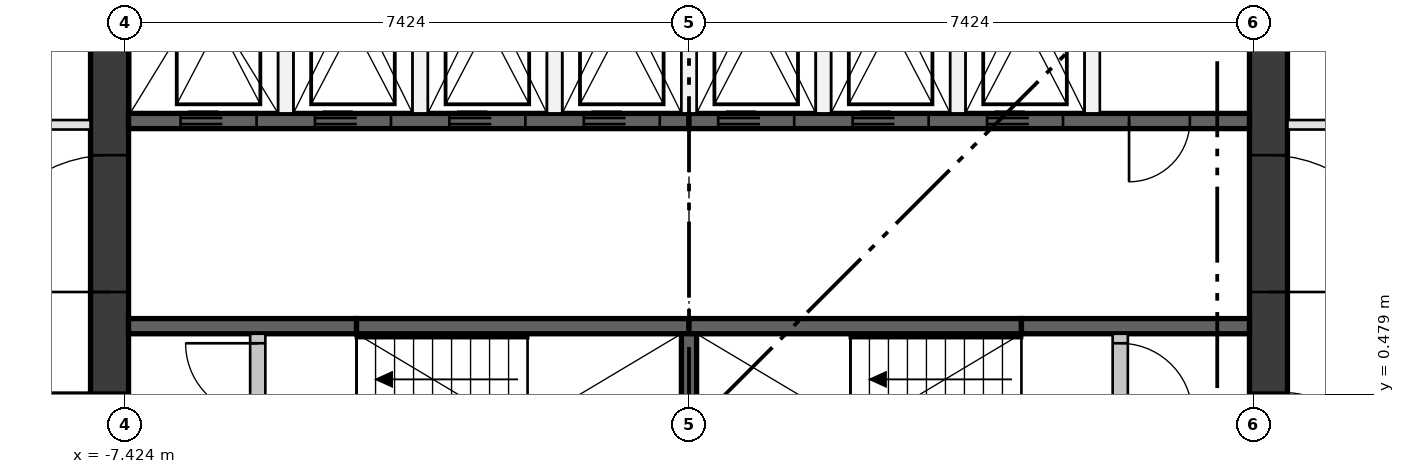
"""IFC4 building model, lengths in metres.
Left out: names, types, materials, properties, quantities, classifications, styles, units other than length and angle.
Written with IfcOpenShell. Run it as: python <this file> out.ifc"""

import sys

from ifc_helpers import new_model, si_unit, direction, frame, frame_2d, origin, place, context, subcontext, project, spatial, rectangle, extrude, element, fill, save


model = new_model("IFC4")
c1 = context("Model", 3, precision=1e-05, world=origin(), true_north=direction((0.0, 1.0)))
c2 = subcontext(c1, "Body", "Model", "MODEL_VIEW")
j1 = project(units=[si_unit("LENGTHUNIT", "METRE"), si_unit("PLANEANGLEUNIT", "RADIAN")], contexts=[c1])
p1 = place(None, origin())
s1 = spatial("IfcSite", under=j1, at=p1, CompositionType="ELEMENT")
p2 = place(p1, origin())
s2 = spatial("IfcBuilding", under=s1, at=p2, CompositionType="ELEMENT")
p3 = place(p2, frame((0.0, 0.0, 174.25)))
s3 = spatial("IfcBuildingStorey", under=s2, at=p3, CompositionType="ELEMENT", Elevation=174.25)
p4 = place(p3, frame((-7.624, -7.374, 0.0), z_axis=(0.0, 0.0, 1.0), x_axis=(0.0, 1.0, 0.0)))
e1 = element("IfcWall", 1, at=p4, inside=s3, PredefinedType="SHEAR", context=c2, shape_type="SweptSolid", body=[
    extrude(rectangle(XDim=14.748, YDim=0.5, at=frame_2d((7.374, 0.0))), origin(), (0.0, 0.0, 1.0), 3.35),
])
p5 = place(p4, frame((6.874, 0.0, 0.0)))
e2 = element("IfcOpeningElement", 2, at=p5, cuts=e1, PredefinedType="OPENING", context=c2, shape_type="SweptSolid", body=[
    extrude(rectangle(XDim=1.0, YDim=2.1, at=frame_2d((0.5, 1.05))), frame((0.0, 0.26, 0.0), z_axis=(0.0, -1.0, 0.0), x_axis=(1.0, 0.0, 0.0)), (0.0, 0.0, 1.0), 0.52),
])
p6 = place(p4, frame((3.75, 0.0, 0.0)))
e3 = element("IfcOpeningElement", 3, at=p6, cuts=e1, PredefinedType="OPENING", context=c2, shape_type="SweptSolid", body=[
    extrude(rectangle(XDim=1.8, YDim=2.1, at=frame_2d((0.9, 1.05))), frame((0.0, 0.26, 0.0), z_axis=(0.0, -1.0, 0.0), x_axis=(1.0, 0.0, 0.0)), (0.0, 0.0, 1.0), 0.52),
])
p7 = place(p4, frame((9.198, 0.0, 0.0)))
e4 = element("IfcOpeningElement", 4, at=p7, cuts=e1, PredefinedType="OPENING", context=c2, shape_type="SweptSolid", body=[
    extrude(rectangle(XDim=1.8, YDim=2.1, at=frame_2d((0.9, 1.05))), frame((0.0, 0.26, 0.0), z_axis=(0.0, -1.0, 0.0), x_axis=(1.0, 0.0, 0.0)), (0.0, 0.0, 1.0), 0.52),
])
p8 = place(p3, frame((7.624, -7.374, 0.0), z_axis=(0.0, 0.0, 1.0), x_axis=(0.0, 1.0, 0.0)))
e5 = element("IfcWall", 5, at=p8, inside=s3, PredefinedType="SHEAR", context=c2, shape_type="SweptSolid", body=[
    extrude(rectangle(XDim=14.748, YDim=0.5, at=frame_2d((7.374, 0.0))), origin(), (0.0, 0.0, 1.0), 3.35),
])
p9 = place(p8, frame((6.874, 0.0, 0.0)))
e6 = element("IfcOpeningElement", 6, at=p9, cuts=e5, PredefinedType="OPENING", context=c2, shape_type="SweptSolid", body=[
    extrude(rectangle(XDim=1.0, YDim=2.1, at=frame_2d((0.5, 1.05))), frame((0.0, 0.26, 0.0), z_axis=(0.0, -1.0, 0.0), x_axis=(1.0, 0.0, 0.0)), (0.0, 0.0, 1.0), 0.52),
])
p10 = place(p8, frame((3.75, 0.0, 0.0)))
e7 = element("IfcOpeningElement", 7, at=p10, cuts=e5, PredefinedType="OPENING", context=c2, shape_type="SweptSolid", body=[
    extrude(rectangle(XDim=1.8, YDim=2.1, at=frame_2d((0.9, 1.05))), frame((0.0, 0.26, 0.0), z_axis=(0.0, -1.0, 0.0), x_axis=(1.0, 0.0, 0.0)), (0.0, 0.0, 1.0), 0.52),
])
p11 = place(p8, frame((9.198, 0.0, 0.0)))
e8 = element("IfcOpeningElement", 8, at=p11, cuts=e5, PredefinedType="OPENING", context=c2, shape_type="SweptSolid", body=[
    extrude(rectangle(XDim=1.8, YDim=2.1, at=frame_2d((0.9, 1.05))), frame((0.0, 0.26, 0.0), z_axis=(0.0, -1.0, 0.0), x_axis=(1.0, 0.0, 0.0)), (0.0, 0.0, 1.0), 0.52),
])
p12 = place(p3, frame((-7.374, 4.074, 0.0), z_axis=(0.0, 0.0, 1.0), x_axis=(1.0, 0.0, 0.0)))
e9 = element("IfcWall", 9, at=p12, inside=s3, PredefinedType="SHEAR", context=c2, shape_type="SweptSolid", body=[
    extrude(rectangle(XDim=7.374, YDim=0.2, at=frame_2d((3.687, 0.0))), origin(), (0.0, 0.0, 1.0), 3.0),
])
p13 = place(p12, frame((0.684, 0.0, 0.0)))
e10 = element("IfcOpeningElement", 10, at=p13, cuts=e9, PredefinedType="OPENING", context=c2, shape_type="SweptSolid", body=[
    extrude(rectangle(XDim=1.0, YDim=2.1, at=frame_2d((0.5, 1.05))), frame((0.0, 0.11, 0.0), z_axis=(0.0, -1.0, 0.0), x_axis=(1.0, 0.0, 0.0)), (0.0, 0.0, 1.0), 0.22),
])
p14 = place(p12, frame((2.453, 0.0, 0.0)))
e11 = element("IfcOpeningElement", 11, at=p14, cuts=e9, PredefinedType="OPENING", context=c2, shape_type="SweptSolid", body=[
    extrude(rectangle(XDim=1.0, YDim=2.1, at=frame_2d((0.5, 1.05))), frame((0.0, 0.11, 0.0), z_axis=(0.0, -1.0, 0.0), x_axis=(1.0, 0.0, 0.0)), (0.0, 0.0, 1.0), 0.22),
])
p15 = place(p12, frame((4.221, 0.0, 0.0)))
e12 = element("IfcOpeningElement", 12, at=p15, cuts=e9, PredefinedType="OPENING", context=c2, shape_type="SweptSolid", body=[
    extrude(rectangle(XDim=1.0, YDim=2.1, at=frame_2d((0.5, 1.05))), frame((0.0, 0.11, 0.0), z_axis=(0.0, -1.0, 0.0), x_axis=(1.0, 0.0, 0.0)), (0.0, 0.0, 1.0), 0.22),
])
p16 = place(p12, frame((5.99, 0.0, 0.0)))
e13 = element("IfcOpeningElement", 13, at=p16, cuts=e9, PredefinedType="OPENING", context=c2, shape_type="SweptSolid", body=[
    extrude(rectangle(XDim=1.0, YDim=2.1, at=frame_2d((0.5, 1.05))), frame((0.0, 0.11, 0.0), z_axis=(0.0, -1.0, 0.0), x_axis=(1.0, 0.0, 0.0)), (0.0, 0.0, 1.0), 0.22),
])
p17 = place(p3, frame((0.0, 4.074, 0.0), z_axis=(0.0, 0.0, 1.0), x_axis=(1.0, 0.0, 0.0)))
e14 = element("IfcWall", 14, at=p17, inside=s3, PredefinedType="SHEAR", context=c2, shape_type="SweptSolid", body=[
    extrude(rectangle(XDim=7.374, YDim=0.2, at=frame_2d((3.687, 0.0))), origin(), (0.0, 0.0, 1.0), 3.0),
])
p18 = place(p17, frame((0.384, 0.0, 0.0)))
e15 = element("IfcOpeningElement", 15, at=p18, cuts=e14, PredefinedType="OPENING", context=c2, shape_type="SweptSolid", body=[
    extrude(rectangle(XDim=1.0, YDim=2.1, at=frame_2d((0.5, 1.05))), frame((0.0, 0.11, 0.0), z_axis=(0.0, -1.0, 0.0), x_axis=(1.0, 0.0, 0.0)), (0.0, 0.0, 1.0), 0.22),
])
p19 = place(p17, frame((2.153, 0.0, 0.0)))
e16 = element("IfcOpeningElement", 16, at=p19, cuts=e14, PredefinedType="OPENING", context=c2, shape_type="SweptSolid", body=[
    extrude(rectangle(XDim=1.0, YDim=2.1, at=frame_2d((0.5, 1.05))), frame((0.0, 0.11, 0.0), z_axis=(0.0, -1.0, 0.0), x_axis=(1.0, 0.0, 0.0)), (0.0, 0.0, 1.0), 0.22),
])
p20 = place(p17, frame((3.921, 0.0, 0.0)))
e17 = element("IfcOpeningElement", 17, at=p20, cuts=e14, PredefinedType="OPENING", context=c2, shape_type="SweptSolid", body=[
    extrude(rectangle(XDim=1.0, YDim=2.1, at=frame_2d((0.5, 1.05))), frame((0.0, 0.11, 0.0), z_axis=(0.0, -1.0, 0.0), x_axis=(1.0, 0.0, 0.0)), (0.0, 0.0, 1.0), 0.22),
])
p21 = place(p17, frame((5.79, 0.0, 0.0)))
e18 = element("IfcOpeningElement", 18, at=p21, cuts=e14, PredefinedType="OPENING", context=c2, shape_type="SweptSolid", body=[
    extrude(rectangle(XDim=0.8, YDim=2.1, at=frame_2d((0.4, 1.05))), frame((0.0, 0.11, 0.0), z_axis=(0.0, -1.0, 0.0), x_axis=(1.0, 0.0, 0.0)), (0.0, 0.0, 1.0), 0.22),
])
p22 = place(p3, frame((-7.374, 1.375, 0.0), z_axis=(0.0, 0.0, 1.0), x_axis=(1.0, 0.0, 0.0)))
e19 = element("IfcWall", 19, at=p22, inside=s3, PredefinedType="SHEAR", context=c2, shape_type="SweptSolid", body=[
    extrude(rectangle(XDim=3.0, YDim=0.2, at=frame_2d((1.5, 0.0))), origin(), (0.0, 0.0, 1.0), 3.0),
])
for number, where, z_axis, x_axis in (
    (20, (-4.374, 1.375, 0.0), (0.0, 0.0, 1.0), (1.0, 0.0, 0.0)),
    (21, (0.0, 1.375, 0.0), (0.0, 0.0, 1.0), (1.0, 0.0, 0.0)),
):
    element("IfcWall", number, at=place(p3, frame(where, z_axis=z_axis, x_axis=x_axis)), inside=s3, PredefinedType="SHEAR", context=c2, shape_type="SweptSolid", body=[
        extrude(rectangle(XDim=4.374, YDim=0.2, at=frame_2d((2.187, 0.0))), origin(), (0.0, 0.0, 1.0), 3.0),
    ])
p23 = place(p3, frame((4.374, 1.375, 0.0), z_axis=(0.0, 0.0, 1.0), x_axis=(1.0, 0.0, 0.0)))
e22 = element("IfcWall", 22, at=p23, inside=s3, PredefinedType="SHEAR", context=c2, shape_type="SweptSolid", body=[
    extrude(rectangle(XDim=3.0, YDim=0.2, at=frame_2d((1.5, 0.0))), origin(), (0.0, 0.0, 1.0), 3.0),
])
p24 = place(p3, frame((0.0, -1.275, 0.0), z_axis=(0.0, 0.0, 1.0), x_axis=(0.0, 1.0, 0.0)))
e23 = element("IfcWall", 23, at=p24, inside=s3, PredefinedType="SHEAR", context=c2, shape_type="SweptSolid", body=[
    extrude(rectangle(XDim=2.55, YDim=0.2, at=frame_2d((1.275, 0.0))), origin(), (0.0, 0.0, 1.0), 3.0),
])
for number, where, z_axis, x_axis in (
    (24, (-5.305, 4.174, 0.0), (0.0, 0.0, 1.0), (0.0, 1.0, 0.0)),
    (25, (-3.537, 4.174, 0.0), (0.0, 0.0, 1.0), (0.0, 1.0, 0.0)),
    (26, (-1.769, 4.174, 0.0), (0.0, 0.0, 1.0), (0.0, 1.0, 0.0)),
    (27, (0.0, 4.174, 0.0), (0.0, 0.0, 1.0), (0.0, 1.0, 0.0)),
    (28, (1.769, 4.174, 0.0), (0.0, 0.0, 1.0), (0.0, 1.0, 0.0)),
    (29, (3.537, 4.174, 0.0), (0.0, 0.0, 1.0), (0.0, 1.0, 0.0)),
    (30, (5.305, 4.174, 0.0), (0.0, 0.0, 1.0), (0.0, 1.0, 0.0)),
):
    element("IfcWall", number, at=place(p3, frame(where, z_axis=z_axis, x_axis=x_axis)), inside=s3, PredefinedType="PARTITIONING", context=c2, shape_type="SweptSolid", body=[
        extrude(rectangle(XDim=3.2, YDim=0.2, at=frame_2d((1.6, 0.0))), origin(), (0.0, 0.0, 1.0), 3.0),
    ])
p25 = place(p3, frame((-5.674, -1.275, 0.0), z_axis=(0.0, 0.0, 1.0), x_axis=(0.0, 1.0, 0.0)))
e31 = element("IfcWall", 31, at=p25, inside=s3, PredefinedType="PARTITIONING", context=c2, shape_type="SweptSolid", body=[
    extrude(rectangle(XDim=2.55, YDim=0.2, at=frame_2d((1.275, 0.0))), origin(), (0.0, 0.0, 1.0), 3.0),
])
p26 = place(p25, frame((0.125, 0.0, 0.0)))
e32 = element("IfcOpeningElement", 32, at=p26, cuts=e31, PredefinedType="OPENING", context=c2, shape_type="SweptSolid", body=[
    extrude(rectangle(XDim=0.95, YDim=2.1, at=frame_2d((0.475, 1.05))), frame((0.0, 0.11, 0.0), z_axis=(0.0, -1.0, 0.0), x_axis=(1.0, 0.0, 0.0)), (0.0, 0.0, 1.0), 0.22),
])
p27 = place(p25, frame((1.475, 0.0, 0.0)))
e33 = element("IfcOpeningElement", 33, at=p27, cuts=e31, PredefinedType="OPENING", context=c2, shape_type="SweptSolid", body=[
    extrude(rectangle(XDim=0.95, YDim=2.1, at=frame_2d((0.475, 1.05))), frame((0.0, 0.11, 0.0), z_axis=(0.0, -1.0, 0.0), x_axis=(1.0, 0.0, 0.0)), (0.0, 0.0, 1.0), 0.22),
])
p28 = place(p3, frame((5.674, -1.275, 0.0), z_axis=(0.0, 0.0, 1.0), x_axis=(0.0, 1.0, 0.0)))
e34 = element("IfcWall", 34, at=p28, inside=s3, PredefinedType="PARTITIONING", context=c2, shape_type="SweptSolid", body=[
    extrude(rectangle(XDim=2.55, YDim=0.2, at=frame_2d((1.275, 0.0))), origin(), (0.0, 0.0, 1.0), 3.0),
])
p29 = place(p28, frame((0.125, 0.0, 0.0)))
e35 = element("IfcOpeningElement", 35, at=p29, cuts=e34, PredefinedType="OPENING", context=c2, shape_type="SweptSolid", body=[
    extrude(rectangle(XDim=0.95, YDim=2.1, at=frame_2d((0.475, 1.05))), frame((0.0, 0.11, 0.0), z_axis=(0.0, -1.0, 0.0), x_axis=(1.0, 0.0, 0.0)), (0.0, 0.0, 1.0), 0.22),
])
p30 = place(p28, frame((1.475, 0.0, 0.0)))
e36 = element("IfcOpeningElement", 36, at=p30, cuts=e34, PredefinedType="OPENING", context=c2, shape_type="SweptSolid", body=[
    extrude(rectangle(XDim=0.95, YDim=2.1, at=frame_2d((0.475, 1.05))), frame((0.0, 0.11, 0.0), z_axis=(0.0, -1.0, 0.0), x_axis=(1.0, 0.0, 0.0)), (0.0, 0.0, 1.0), 0.22),
])
p31 = place(p3, frame((7.874, 4.024, 0.0), z_axis=(0.0, 0.0, 1.0), x_axis=(1.0, 0.0, 0.0)))
e37 = element("IfcWall", 37, at=p31, inside=s3, PredefinedType="PARTITIONING", context=c2, shape_type="SweptSolid", body=[
    extrude(rectangle(XDim=4.741, YDim=0.125, at=frame_2d((2.37, 0.0))), origin(), (0.0, 0.0, 1.0), 3.0),
])
p32 = place(p31, frame((1.5, 0.0, 0.0)))
e38 = element("IfcOpeningElement", 38, at=p32, cuts=e37, PredefinedType="OPENING", context=c2, shape_type="SweptSolid", body=[
    extrude(rectangle(XDim=1.8, YDim=2.1, at=frame_2d((0.9, 1.05))), frame((0.0, 0.073, 0.0), z_axis=(0.0, -1.0, 0.0), x_axis=(1.0, 0.0, 0.0)), (0.0, 0.0, 1.0), 0.145),
])
p33 = place(p3, frame((-12.404, 4.024, 0.0), z_axis=(0.0, 0.0, 1.0), x_axis=(1.0, 0.0, 0.0)))
e39 = element("IfcWall", 39, at=p33, inside=s3, PredefinedType="PARTITIONING", context=c2, shape_type="SweptSolid", body=[
    extrude(rectangle(XDim=4.53, YDim=0.125, at=frame_2d((2.265, 0.0))), origin(), (0.0, 0.0, 1.0), 3.0),
])
p34 = place(p33, frame((1.8, 0.0, 0.0)))
e40 = element("IfcOpeningElement", 40, at=p34, cuts=e39, PredefinedType="OPENING", context=c2, shape_type="SweptSolid", body=[
    extrude(rectangle(XDim=1.0, YDim=2.1, at=frame_2d((0.5, 1.05))), frame((0.0, 0.073, 0.0), z_axis=(0.0, -1.0, 0.0), x_axis=(1.0, 0.0, 0.0)), (0.0, 0.0, 1.0), 0.145),
])
p35 = place(p13, frame((1.0, 0.0, 0.0), z_axis=(0.0, 0.0, 1.0), x_axis=(-1.0, 0.0, 0.0)))
e41 = element("IfcDoor", 41, at=p35, inside=s3, OperationType="DOUBLE_DOOR_SLIDING", PredefinedType="DOOR", context=c2, shape_type="SweptSolid", body=[
    extrude(rectangle(XDim=1.0, YDim=2.1, at=frame_2d((0.5, 1.05))), frame((0.0, 0.025, 0.0), z_axis=(0.0, -1.0, 0.0), x_axis=(1.0, 0.0, 0.0)), (0.0, 0.0, 1.0), 0.05),
])
fill(e10, e41)
p36 = place(p14, frame((1.0, 0.0, 0.0), z_axis=(0.0, 0.0, 1.0), x_axis=(-1.0, 0.0, 0.0)))
e42 = element("IfcDoor", 42, at=p36, inside=s3, OperationType="DOUBLE_DOOR_SLIDING", PredefinedType="DOOR", context=c2, shape_type="SweptSolid", body=[
    extrude(rectangle(XDim=1.0, YDim=2.1, at=frame_2d((0.5, 1.05))), frame((0.0, 0.025, 0.0), z_axis=(0.0, -1.0, 0.0), x_axis=(1.0, 0.0, 0.0)), (0.0, 0.0, 1.0), 0.05),
])
fill(e11, e42)
p37 = place(p15, frame((1.0, 0.0, 0.0), z_axis=(0.0, 0.0, 1.0), x_axis=(-1.0, 0.0, 0.0)))
e43 = element("IfcDoor", 43, at=p37, inside=s3, OperationType="DOUBLE_DOOR_SLIDING", PredefinedType="DOOR", context=c2, shape_type="SweptSolid", body=[
    extrude(rectangle(XDim=1.0, YDim=2.1, at=frame_2d((0.5, 1.05))), frame((0.0, 0.025, 0.0), z_axis=(0.0, -1.0, 0.0), x_axis=(1.0, 0.0, 0.0)), (0.0, 0.0, 1.0), 0.05),
])
fill(e12, e43)
p38 = place(p16, frame((1.0, 0.0, 0.0), z_axis=(0.0, 0.0, 1.0), x_axis=(-1.0, 0.0, 0.0)))
e44 = element("IfcDoor", 44, at=p38, inside=s3, OperationType="DOUBLE_DOOR_SLIDING", PredefinedType="DOOR", context=c2, shape_type="SweptSolid", body=[
    extrude(rectangle(XDim=1.0, YDim=2.1, at=frame_2d((0.5, 1.05))), frame((0.0, 0.025, 0.0), z_axis=(0.0, -1.0, 0.0), x_axis=(1.0, 0.0, 0.0)), (0.0, 0.0, 1.0), 0.05),
])
fill(e13, e44)
p39 = place(p18, frame((1.0, 0.0, 0.0), z_axis=(0.0, 0.0, 1.0), x_axis=(-1.0, 0.0, 0.0)))
e45 = element("IfcDoor", 45, at=p39, inside=s3, OperationType="DOUBLE_DOOR_SLIDING", PredefinedType="DOOR", context=c2, shape_type="SweptSolid", body=[
    extrude(rectangle(XDim=1.0, YDim=2.1, at=frame_2d((0.5, 1.05))), frame((0.0, 0.025, 0.0), z_axis=(0.0, -1.0, 0.0), x_axis=(1.0, 0.0, 0.0)), (0.0, 0.0, 1.0), 0.05),
])
fill(e15, e45)
p40 = place(p19, frame((1.0, 0.0, 0.0), z_axis=(0.0, 0.0, 1.0), x_axis=(-1.0, 0.0, 0.0)))
e46 = element("IfcDoor", 46, at=p40, inside=s3, OperationType="DOUBLE_DOOR_SLIDING", PredefinedType="DOOR", context=c2, shape_type="SweptSolid", body=[
    extrude(rectangle(XDim=1.0, YDim=2.1, at=frame_2d((0.5, 1.05))), frame((0.0, 0.025, 0.0), z_axis=(0.0, -1.0, 0.0), x_axis=(1.0, 0.0, 0.0)), (0.0, 0.0, 1.0), 0.05),
])
fill(e16, e46)
p41 = place(p20, frame((1.0, 0.0, 0.0), z_axis=(0.0, 0.0, 1.0), x_axis=(-1.0, 0.0, 0.0)))
e47 = element("IfcDoor", 47, at=p41, inside=s3, OperationType="DOUBLE_DOOR_SLIDING", PredefinedType="DOOR", context=c2, shape_type="SweptSolid", body=[
    extrude(rectangle(XDim=1.0, YDim=2.1, at=frame_2d((0.5, 1.05))), frame((0.0, 0.025, 0.0), z_axis=(0.0, -1.0, 0.0), x_axis=(1.0, 0.0, 0.0)), (0.0, 0.0, 1.0), 0.05),
])
fill(e17, e47)
p42 = place(p27, origin())
e48 = element("IfcDoor", 48, at=p42, inside=s3, OperationType="SINGLE_SWING_RIGHT", PredefinedType="DOOR", context=c2, shape_type="SweptSolid", body=[
    extrude(rectangle(XDim=0.95, YDim=2.1, at=frame_2d((0.475, 1.05))), frame((0.0, 0.025, 0.0), z_axis=(0.0, -1.0, 0.0), x_axis=(1.0, 0.0, 0.0)), (0.0, 0.0, 1.0), 0.05),
])
fill(e33, e48)
p43 = place(p30, frame((0.95, 0.0, 0.0), z_axis=(0.0, 0.0, 1.0), x_axis=(-1.0, 0.0, 0.0)))
e49 = element("IfcDoor", 49, at=p43, inside=s3, OperationType="SINGLE_SWING_LEFT", PredefinedType="DOOR", context=c2, shape_type="SweptSolid", body=[
    extrude(rectangle(XDim=0.95, YDim=2.1, at=frame_2d((0.475, 1.05))), frame((0.0, 0.025, 0.0), z_axis=(0.0, -1.0, 0.0), x_axis=(1.0, 0.0, 0.0)), (0.0, 0.0, 1.0), 0.05),
])
fill(e36, e49)
p44 = place(p21, frame((0.8, 0.0, 0.0), z_axis=(0.0, 0.0, 1.0), x_axis=(-1.0, 0.0, 0.0)))
e50 = element("IfcDoor", 50, at=p44, inside=s3, OperationType="SINGLE_SWING_LEFT", PredefinedType="DOOR", context=c2, shape_type="SweptSolid", body=[
    extrude(rectangle(XDim=0.8, YDim=2.1, at=frame_2d((0.4, 1.05))), frame((0.0, 0.025, 0.0), z_axis=(0.0, -1.0, 0.0), x_axis=(1.0, 0.0, 0.0)), (0.0, 0.0, 1.0), 0.05),
])
fill(e18, e50)
p45 = place(p5, origin())
e51 = element("IfcDoor", 51, at=p45, inside=s3, OperationType="SINGLE_SWING_RIGHT", PredefinedType="DOOR", context=c2, shape_type="SweptSolid", body=[
    extrude(rectangle(XDim=1.0, YDim=2.1, at=frame_2d((0.5, 1.05))), frame((0.0, 0.25, 0.0), z_axis=(0.0, -1.0, 0.0), x_axis=(1.0, 0.0, 0.0)), (0.0, 0.0, 1.0), 0.05),
])
fill(e2, e51)
p46 = place(p7, origin())
e52 = element("IfcDoor", 52, at=p46, inside=s3, OperationType="DOUBLE_DOOR_SINGLE_SWING", PredefinedType="DOOR", context=c2, shape_type="SweptSolid", body=[
    extrude(rectangle(XDim=1.8, YDim=2.1, at=frame_2d((0.9, 1.05))), frame((0.0, 0.025, 0.0), z_axis=(0.0, -1.0, 0.0), x_axis=(1.0, 0.0, 0.0)), (0.0, 0.0, 1.0), 0.05),
])
fill(e4, e52)
p47 = place(p9, frame((1.0, 0.0, 0.0), z_axis=(0.0, 0.0, 1.0), x_axis=(-1.0, 0.0, 0.0)))
e53 = element("IfcDoor", 53, at=p47, inside=s3, OperationType="SINGLE_SWING_LEFT", PredefinedType="DOOR", context=c2, shape_type="SweptSolid", body=[
    extrude(rectangle(XDim=1.0, YDim=2.1, at=frame_2d((0.5, 1.05))), frame((0.0, 0.25, 0.0), z_axis=(0.0, -1.0, 0.0), x_axis=(1.0, 0.0, 0.0)), (0.0, 0.0, 1.0), 0.05),
])
fill(e6, e53)
p48 = place(p11, frame((1.8, 0.0, 0.0), z_axis=(0.0, 0.0, 1.0), x_axis=(-1.0, 0.0, 0.0)))
e54 = element("IfcDoor", 54, at=p48, inside=s3, OperationType="DOUBLE_DOOR_SINGLE_SWING", PredefinedType="DOOR", context=c2, shape_type="SweptSolid", body=[
    extrude(rectangle(XDim=1.8, YDim=2.1, at=frame_2d((0.9, 1.05))), frame((0.0, 0.025, 0.0), z_axis=(0.0, -1.0, 0.0), x_axis=(1.0, 0.0, 0.0)), (0.0, 0.0, 1.0), 0.05),
])
fill(e8, e54)
save(model, sys.argv[1])
